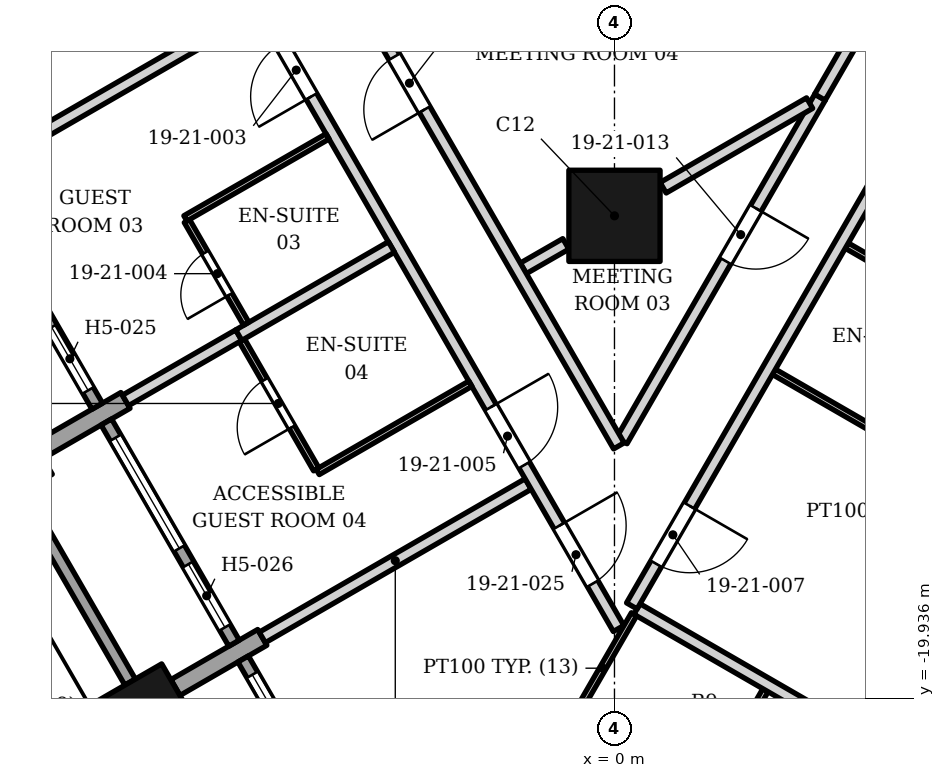
"""IFC4 building model, lengths in metres.
Left out: names, types, materials, properties, quantities, classifications, styles, units other than length and angle.
Written with IfcOpenShell. Run it as: python <this file> out.ifc"""

import sys

from ifc_helpers import new_model, si_unit, direction, frame, frame_2d, origin, origin_2d, place, context, subcontext, project, spatial, rectangle, extrude, element, fill, save


model = new_model("IFC4")
c1 = context("Model", 3, precision=1e-05, world=origin(), true_north=direction((0.0, 1.0)))
c2 = subcontext(c1, "Body", "Model", "MODEL_VIEW")
j1 = project(units=[si_unit("LENGTHUNIT", "METRE"), si_unit("PLANEANGLEUNIT", "RADIAN")], contexts=[c1])
p1 = place(None, origin())
s1 = spatial("IfcSite", under=j1, at=p1, CompositionType="ELEMENT")
p2 = place(p1, origin())
s2 = spatial("IfcBuilding", under=s1, at=p2, CompositionType="ELEMENT")
p3 = place(p2, frame((0.0, 0.0, 91.8)))
s3 = spatial("IfcBuildingStorey", under=s2, at=p3, CompositionType="ELEMENT", Elevation=91.8)
p4 = place(p3, frame((0.0, -12.0, 0.0), z_axis=(0.0, 0.0, 1.0), x_axis=(1.0, 0.0, 0.0)))
e1 = element("IfcColumn", 1, at=p4, inside=s3, PredefinedType="COLUMN", context=c2, shape_type="SweptSolid", body=[
    extrude(rectangle(XDim=1.5, YDim=1.5, at=origin_2d()), origin(), (0.0, 0.0, 1.0), 3.4),
])
p5 = place(p3, frame((-7.741, -20.058, 0.0), z_axis=(0.0, 0.0, 1.0), x_axis=(0.5, -0.866025403784, 0.0)))
e2 = element("IfcColumn", 2, at=p5, inside=s3, PredefinedType="COLUMN", context=c2, shape_type="SweptSolid", body=[
    extrude(rectangle(XDim=0.9, YDim=1.2, at=origin_2d()), origin(), (0.0, 0.0, 1.0), 3.4),
])
p6 = place(p3, frame((-10.51, -16.46, 0.0), z_axis=(0.0, 0.0, 1.0), x_axis=(0.865955154139, 0.50012165622, 0.0)))
e3 = element("IfcWall", 3, at=p6, inside=s3, PredefinedType="SOLIDWALL", context=c2, shape_type="SweptSolid", body=[
    extrude(rectangle(XDim=1.2, YDim=0.9, at=frame_2d((0.6, 0.0))), origin(), (0.0, 0.0, 1.0), 2.63),
])
for number, where, z_axis, x_axis in (
    (4, (-8.042, -15.035, 0.0), (0.0, 0.0, 1.0), (-0.866, -0.5, 0.0)),
    (5, (-7.221, -19.758, 0.0), (0.0, 0.0, 1.0), (0.866, 0.5, 0.0)),
):
    element("IfcWall", number, at=place(p3, frame(where, z_axis=z_axis, x_axis=x_axis)), inside=s3, PredefinedType="SOLIDWALL", context=c2, shape_type="SweptSolid", body=[
        extrude(rectangle(XDim=1.65, YDim=0.3, at=frame_2d((0.825, 0.0))), origin(), (0.0, 0.0, 1.0), 2.65),
    ])
p7 = place(p3, frame((-10.607, -11.493, 0.0), z_axis=(0.0, 0.0, 1.0), x_axis=(0.500002543286, -0.866023935413, 0.0)))
e6 = element("IfcWall", 6, at=p7, inside=s3, PredefinedType="ELEMENTEDWALL", context=c2, shape_type="SweptSolid", body=[
    extrude(rectangle(XDim=4.2, YDim=0.2, at=frame_2d((2.1, 0.0))), origin(), (0.0, 0.0, 1.0), 2.45),
])
p8 = place(p7, frame((0.3, 0.0, 0.6)))
e7 = element("IfcOpeningElement", 7, at=p8, cuts=e6, PredefinedType="OPENING", context=c2, shape_type="SweptSolid", body=[
    extrude(rectangle(XDim=2.1, YDim=1.75, at=frame_2d((1.05, 0.875))), frame((0.0, 0.11, 0.0), z_axis=(0.0, -1.0, 0.0), x_axis=(1.0, 0.0, 0.0)), (0.0, 0.0, 1.0), 0.22),
])
p9 = place(p7, frame((2.7, 0.0, 0.0)))
e8 = element("IfcOpeningElement", 8, at=p9, cuts=e6, PredefinedType="OPENING", context=c2, shape_type="SweptSolid", body=[
    extrude(rectangle(XDim=1.2, YDim=2.35, at=frame_2d((0.6, 1.175))), frame((0.0, 0.11, 0.0), z_axis=(0.0, -1.0, 0.0), x_axis=(1.0, 0.0, 0.0)), (0.0, 0.0, 1.0), 0.22),
])
p10 = place(p3, frame((-9.766, -16.55, 0.0), z_axis=(0.0, 0.0, 1.0), x_axis=(0.499931829785, -0.866064758299, 0.0)))
e9 = element("IfcWall", 9, at=p10, inside=s3, PredefinedType="SOLIDWALL", context=c2, shape_type="SweptSolid", body=[
    extrude(rectangle(XDim=3.6, YDim=0.2, at=frame_2d((1.8, 0.0))), origin(), (0.0, 0.0, 1.0), 2.63),
])
p11 = place(p3, frame((-8.357, -15.39, 0.0), z_axis=(0.0, 0.0, 1.0), x_axis=(0.500027713859, -0.866009402589, 0.0)))
e10 = element("IfcWall", 10, at=p11, inside=s3, PredefinedType="ELEMENTEDWALL", context=c2, shape_type="SweptSolid", body=[
    extrude(rectangle(XDim=4.2, YDim=0.2, at=frame_2d((2.1, 0.0))), origin(), (0.0, 0.0, 1.0), 2.65),
])
p12 = place(p11, frame((0.3, 0.0, 0.6)))
e11 = element("IfcOpeningElement", 11, at=p12, cuts=e10, PredefinedType="OPENING", context=c2, shape_type="SweptSolid", body=[
    extrude(rectangle(XDim=2.1, YDim=1.8, at=frame_2d((1.05, 0.9))), frame((0.0, 0.11, 0.0), z_axis=(0.0, -1.0, 0.0), x_axis=(1.0, 0.0, 0.0)), (0.0, 0.0, 1.0), 0.22),
])
p13 = place(p11, frame((2.7, 0.0, 0.0)))
e12 = element("IfcOpeningElement", 12, at=p13, cuts=e10, PredefinedType="OPENING", context=c2, shape_type="SweptSolid", body=[
    extrude(rectangle(XDim=1.2, YDim=2.4, at=frame_2d((0.6, 1.2))), frame((0.0, 0.11, 0.0), z_axis=(0.0, -1.0, 0.0), x_axis=(1.0, 0.0, 0.0)), (0.0, 0.0, 1.0), 0.22),
])
p14 = place(p3, frame((-6.107, -19.287, 0.0), z_axis=(0.0, 0.0, 1.0), x_axis=(0.500002543286, -0.866023935413, 0.0)))
e13 = element("IfcWall", 13, at=p14, inside=s3, PredefinedType="ELEMENTEDWALL", context=c2, shape_type="SweptSolid", body=[
    extrude(rectangle(XDim=4.2, YDim=0.2, at=frame_2d((2.1, 0.0))), origin(), (0.0, 0.0, 1.0), 2.628),
])
p15 = place(p14, frame((0.3, 0.0, 0.6)))
e14 = element("IfcOpeningElement", 14, at=p15, cuts=e13, PredefinedType="OPENING", context=c2, shape_type="SweptSolid", body=[
    extrude(rectangle(XDim=2.1, YDim=1.8, at=frame_2d((1.05, 0.9))), frame((0.0, 0.11, 0.0), z_axis=(0.0, -1.0, 0.0), x_axis=(1.0, 0.0, 0.0)), (0.0, 0.0, 1.0), 0.22),
])
p16 = place(p14, frame((2.7, 0.0, 0.0)))
e15 = element("IfcOpeningElement", 15, at=p16, cuts=e13, PredefinedType="OPENING", context=c2, shape_type="SweptSolid", body=[
    extrude(rectangle(XDim=1.2, YDim=2.4, at=frame_2d((0.6, 1.2))), frame((0.0, 0.11, 0.0), z_axis=(0.0, -1.0, 0.0), x_axis=(1.0, 0.0, 0.0)), (0.0, 0.0, 1.0), 0.22),
])
p17 = place(p3, frame((1.46, -21.576, 0.0), z_axis=(0.0, 0.0, 1.0), x_axis=(0.499354689006, 0.866397653833, 0.0)))
e16 = element("IfcWall", 16, at=p17, inside=s3, PredefinedType="PARTITIONING", context=c2, shape_type="SweptSolid", body=[
    extrude(rectangle(XDim=2.05, YDim=0.1, at=frame_2d((1.025, 0.0))), origin(), (0.0, 0.0, 1.0), 3.23),
])
p18 = place(p3, frame((-5.792, -18.933, 0.0), z_axis=(0.0, 0.0, 1.0), x_axis=(0.866155802953, 0.499774073968, 0.0)))
e17 = element("IfcWall", 17, at=p18, inside=s3, PredefinedType="PARTITIONING", context=c2, shape_type="SweptSolid", body=[
    extrude(rectangle(XDim=5.05, YDim=0.2, at=frame_2d((2.525, 0.0))), origin(), (0.0, 0.0, 1.0), 2.628),
])
p19 = place(p3, frame((-10.334, -0.77, 0.0), z_axis=(0.0, 0.0, 1.0), x_axis=(0.499996405163, -0.866027479255, 0.0)))
e18 = element("IfcWall", 18, at=p19, inside=s3, PredefinedType="PARTITIONING", context=c2, shape_type="SweptSolid", body=[
    extrude(rectangle(XDim=20.803, YDim=0.2, at=frame_2d((10.401, 0.0))), origin(), (0.0, 0.0, 1.0), 2.384),
])
p20 = place(p19, frame((4.0, 0.0, 0.0)))
e19 = element("IfcOpeningElement", 19, at=p20, cuts=e18, PredefinedType="OPENING", context=c2, shape_type="SweptSolid", body=[
    extrude(rectangle(XDim=1.0, YDim=2.1, at=frame_2d((0.5, 1.05))), frame((0.0, 0.11, 0.0), z_axis=(0.0, -1.0, 0.0), x_axis=(1.0, 0.0, 0.0)), (0.0, 0.0, 1.0), 0.22),
])
p21 = place(p19, frame((9.7, 0.0, 0.0)))
e20 = element("IfcOpeningElement", 20, at=p21, cuts=e18, PredefinedType="OPENING", context=c2, shape_type="SweptSolid", body=[
    extrude(rectangle(XDim=1.0, YDim=2.1, at=frame_2d((0.5, 1.05))), frame((0.0, 0.11, 0.0), z_axis=(0.0, -1.0, 0.0), x_axis=(1.0, 0.0, 0.0)), (0.0, 0.0, 1.0), 0.22),
])
p22 = place(p19, frame((16.6, 0.0, 0.0)))
e21 = element("IfcOpeningElement", 21, at=p22, cuts=e18, PredefinedType="OPENING", context=c2, shape_type="SweptSolid", body=[
    extrude(rectangle(XDim=1.1, YDim=2.1, at=frame_2d((0.55, 1.05))), frame((0.0, 0.11, 0.0), z_axis=(0.0, -1.0, 0.0), x_axis=(1.0, 0.0, 0.0)), (0.0, 0.0, 1.0), 0.22),
])
p23 = place(p19, frame((18.852, 0.0, 0.0)))
e22 = element("IfcOpeningElement", 22, at=p23, cuts=e18, PredefinedType="OPENING", context=c2, shape_type="SweptSolid", body=[
    extrude(rectangle(XDim=1.1, YDim=2.1, at=frame_2d((0.55, 1.05))), frame((0.0, 0.11, 0.0), z_axis=(0.0, -1.0, 0.0), x_axis=(1.0, 0.0, 0.0)), (0.0, 0.0, 1.0), 0.22),
])
p24 = place(p3, frame((-0.705, -20.326, 0.0), z_axis=(0.0, 0.0, 1.0), x_axis=(0.500698204548, 0.865621919756, 0.0)))
e23 = element("IfcWall", 23, at=p24, inside=s3, PredefinedType="PARTITIONING", context=c2, shape_type="SweptSolid", body=[
    extrude(rectangle(XDim=2.05, YDim=0.1, at=frame_2d((1.025, 0.0))), origin(), (0.0, 0.0, 1.0), 2.552),
])
p25 = place(p3, frame((0.37, -18.466, 0.0), z_axis=(0.0, 0.0, 1.0), x_axis=(0.866027438349, -0.499996476014, 0.0)))
e24 = element("IfcWall", 24, at=p25, inside=s3, PredefinedType="PARTITIONING", context=c2, shape_type="SweptSolid", body=[
    extrude(rectangle(XDim=7.25, YDim=0.2, at=frame_2d((3.625, 0.0))), origin(), (0.0, 0.0, 1.0), 2.552),
])
p26 = place(p3, frame((-4.88, -16.212, 0.0), z_axis=(0.0, 0.0, 1.0), x_axis=(0.865729701078, 0.500511822708, 0.0)))
e25 = element("IfcWall", 25, at=p26, inside=s3, PredefinedType="PARTITIONING", context=c2, shape_type="SweptSolid", body=[
    extrude(rectangle(XDim=2.9, YDim=0.1, at=frame_2d((1.45, 0.0))), origin(), (0.0, 0.0, 1.0), 2.628),
])
p27 = place(p3, frame((0.119, -15.698, 0.0), z_axis=(0.0, 0.0, 1.0), x_axis=(0.499994537821, 0.866028557352, 0.0)))
e26 = element("IfcWall", 26, at=p27, inside=s3, PredefinedType="PARTITIONING", context=c2, shape_type="SweptSolid", body=[
    extrude(rectangle(XDim=6.524, YDim=0.2, at=frame_2d((3.262, 0.0))), origin(), (0.0, 0.0, 1.0), 2.302),
])
p28 = place(p27, frame((3.413, 0.0, 0.0)))
e27 = element("IfcOpeningElement", 27, at=p28, cuts=e26, PredefinedType="OPENING", context=c2, shape_type="SweptSolid", body=[
    extrude(rectangle(XDim=1.0, YDim=2.1, at=frame_2d((0.5, 1.05))), frame((0.0, 0.11, 0.0), z_axis=(0.0, -1.0, 0.0), x_axis=(1.0, 0.0, 0.0)), (0.0, 0.0, 1.0), 0.22),
])
p29 = place(p3, frame((2.621, -14.565, 0.0), z_axis=(0.0, 0.0, 1.0), x_axis=(0.866035857012, -0.499981894041, 0.0)))
e28 = element("IfcWall", 28, at=p29, inside=s3, PredefinedType="PARTITIONING", context=c2, shape_type="SweptSolid", body=[
    extrude(rectangle(XDim=7.25, YDim=0.1, at=frame_2d((3.625, 0.0))), origin(), (0.0, 0.0, 1.0), 2.552),
])
p30 = place(p29, frame((4.65, 0.0, 0.0)))
e29 = element("IfcOpeningElement", 29, at=p30, cuts=e28, PredefinedType="OPENING", context=c2, shape_type="SweptSolid", body=[
    extrude(rectangle(XDim=0.9, YDim=2.1, at=frame_2d((0.45, 1.05))), frame((0.0, 0.06, 0.0), z_axis=(0.0, -1.0, 0.0), x_axis=(1.0, 0.0, 0.0)), (0.0, 0.0, 1.0), 0.12),
])
p31 = place(p3, frame((-6.129, -14.046, 0.0), z_axis=(0.0, 0.0, 1.0), x_axis=(0.499408942836, -0.866366381974, 0.0)))
e30 = element("IfcWall", 30, at=p31, inside=s3, PredefinedType="PARTITIONING", context=c2, shape_type="SweptSolid", body=[
    extrude(rectangle(XDim=2.45, YDim=0.1, at=frame_2d((1.225, 0.0))), origin(), (0.0, 0.0, 1.0), 3.23),
])
p32 = place(p31, frame((0.75, 0.0, 0.0)))
e31 = element("IfcOpeningElement", 31, at=p32, cuts=e30, PredefinedType="OPENING", context=c2, shape_type="SweptSolid", body=[
    extrude(rectangle(XDim=0.9, YDim=2.1, at=frame_2d((0.45, 1.05))), frame((0.0, 0.06, 0.0), z_axis=(0.0, -1.0, 0.0), x_axis=(1.0, 0.0, 0.0)), (0.0, 0.0, 1.0), 0.12),
])
p33 = place(p3, frame((-8.042, -15.036, 0.0), z_axis=(0.0, 0.0, 1.0), x_axis=(0.866448284977, 0.499266831925, 0.0)))
e32 = element("IfcWall", 32, at=p33, inside=s3, PredefinedType="PARTITIONING", context=c2, shape_type="SweptSolid", body=[
    extrude(rectangle(XDim=2.15, YDim=0.2, at=frame_2d((1.075, 0.0))), origin(), (0.0, 0.0, 1.0), 3.23),
])
p34 = place(p3, frame((3.82, -12.49, 0.0), z_axis=(0.0, 0.0, 1.0), x_axis=(0.866326367614, -0.499478352661, 0.0)))
e33 = element("IfcWall", 33, at=p34, inside=s3, PredefinedType="PARTITIONING", context=c2, shape_type="SweptSolid", body=[
    extrude(rectangle(XDim=2.8, YDim=0.1, at=frame_2d((1.4, 0.0))), origin(), (0.0, 0.0, 1.0), 2.552),
])
p35 = place(p3, frame((-1.501, -12.865, 0.0), z_axis=(0.0, 0.0, 1.0), x_axis=(0.86708889474, 0.49815343883, 0.0)))
e34 = element("IfcWall", 34, at=p35, inside=s3, PredefinedType="PARTITIONING", context=c2, shape_type="SweptSolid", body=[
    extrude(rectangle(XDim=0.809, YDim=0.2, at=frame_2d((0.404, 0.0))), origin(), (0.0, 0.0, 1.0), 3.23),
])
p36 = place(p3, frame((-6.179, -13.962, 0.0), z_axis=(0.0, 0.0, 1.0), x_axis=(0.866011727401, 0.500023687443, 0.0)))
e35 = element("IfcWall", 35, at=p36, inside=s3, PredefinedType="PARTITIONING", context=c2, shape_type="SweptSolid", body=[
    extrude(rectangle(XDim=2.9, YDim=0.2, at=frame_2d((1.45, 0.0))), origin(), (0.0, 0.0, 1.0), 2.628),
])
p37 = place(p3, frame((-7.032, -12.085, 0.0), z_axis=(0.0, 0.0, 1.0), x_axis=(0.500098182527, -0.865968710655, 0.0)))
e36 = element("IfcWall", 36, at=p37, inside=s3, PredefinedType="PARTITIONING", context=c2, shape_type="SweptSolid", body=[
    extrude(rectangle(XDim=1.95, YDim=0.1, at=frame_2d((0.975, 0.0))), origin(), (0.0, 0.0, 1.0), 2.45),
])
p38 = place(p37, frame((0.6, 0.0, 0.0)))
e37 = element("IfcOpeningElement", 37, at=p38, cuts=e36, PredefinedType="OPENING", context=c2, shape_type="SweptSolid", body=[
    extrude(rectangle(XDim=0.8, YDim=2.1, at=frame_2d((0.4, 1.05))), frame((0.0, 0.06, 0.0), z_axis=(0.0, -1.0, 0.0), x_axis=(1.0, 0.0, 0.0)), (0.0, 0.0, 1.0), 0.12),
])
p39 = place(p3, frame((0.8, -11.538, 0.0), z_axis=(0.0, 0.0, 1.0), x_axis=(0.865884499667, 0.500243973713, 0.0)))
e38 = element("IfcWall", 38, at=p39, inside=s3, PredefinedType="PARTITIONING", context=c2, shape_type="SweptSolid", body=[
    extrude(rectangle(XDim=2.782, YDim=0.2, at=frame_2d((1.391, 0.0))), origin(), (0.0, 0.0, 1.0), 3.23),
])
p40 = place(p3, frame((-7.057, -12.042, 0.0), z_axis=(0.0, 0.0, 1.0), x_axis=(0.866339109022, 0.499456252518, 0.0)))
e39 = element("IfcWall", 39, at=p40, inside=s3, PredefinedType="PARTITIONING", context=c2, shape_type="SweptSolid", body=[
    extrude(rectangle(XDim=2.7, YDim=0.1, at=frame_2d((1.35, 0.0))), origin(), (0.0, 0.0, 1.0), 2.45),
])
p41 = place(p3, frame((0.285, -18.415, 0.0), z_axis=(0.0, 0.0, 1.0), x_axis=(0.5000018851, 0.866024315419, 0.0)))
e40 = element("IfcWall", 40, at=p41, inside=s3, PredefinedType="PARTITIONING", context=c2, shape_type="SweptSolid", body=[
    extrude(rectangle(XDim=9.0, YDim=0.2, at=frame_2d((4.5, 0.0))), origin(), (0.0, 0.0, 1.0), 2.302),
])
p42 = place(p41, frame((0.8, 0.0, 0.0)))
e41 = element("IfcOpeningElement", 41, at=p42, cuts=e40, PredefinedType="OPENING", context=c2, shape_type="SweptSolid", body=[
    extrude(rectangle(XDim=1.1, YDim=2.1, at=frame_2d((0.55, 1.05))), frame((0.0, 0.11, 0.0), z_axis=(0.0, -1.0, 0.0), x_axis=(1.0, 0.0, 0.0)), (0.0, 0.0, 1.0), 0.22),
])
p43 = place(p3, frame((3.379, -10.049, 0.0), z_axis=(0.0, 0.0, 1.0), x_axis=(0.50000242408, 0.866024004237, 0.0)))
e42 = element("IfcWall", 42, at=p43, inside=s3, PredefinedType="PARTITIONING", context=c2, shape_type="SweptSolid", body=[
    extrude(rectangle(XDim=15.877, YDim=0.2, at=frame_2d((7.938, 0.0))), origin(), (0.0, 0.0, 1.0), 2.384),
])
p44 = place(p43, frame((9.359, 0.0, 0.0)))
e43 = element("IfcOpeningElement", 43, at=p44, cuts=e42, PredefinedType="OPENING", context=c2, shape_type="SweptSolid", body=[
    extrude(rectangle(XDim=1.0, YDim=2.1, at=frame_2d((0.5, 1.05))), frame((0.0, 0.11, 0.0), z_axis=(0.0, -1.0, 0.0), x_axis=(1.0, 0.0, 0.0)), (0.0, 0.0, 1.0), 0.22),
])
p45 = place(p3, frame((-10.292, -11.138, 0.0), z_axis=(0.0, 0.0, 1.0), x_axis=(0.866188805601, 0.49971687289, 0.0)))
e44 = element("IfcWall", 44, at=p45, inside=s3, PredefinedType="PARTITIONING", context=c2, shape_type="SweptSolid", body=[
    extrude(rectangle(XDim=5.05, YDim=0.2, at=frame_2d((2.525, 0.0))), origin(), (0.0, 0.0, 1.0), 2.552),
])
p46 = place(p3, frame((-11.18, 3.7, 0.0), z_axis=(0.0, 0.0, 1.0), x_axis=(0.500129162475, -0.865950818951, 0.0)))
e45 = element("IfcWall", 45, at=p46, inside=s3, PredefinedType="PARTITIONING", context=c2, shape_type="SweptSolid", body=[
    extrude(rectangle(XDim=22.499, YDim=0.2, at=frame_2d((11.249, 0.0))), origin(), (0.0, 0.0, 1.0), 2.384),
])
p47 = place(p46, frame((9.13, 0.0, 0.0)))
e46 = element("IfcOpeningElement", 46, at=p47, cuts=e45, PredefinedType="OPENING", context=c2, shape_type="SweptSolid", body=[
    extrude(rectangle(XDim=1.0, YDim=2.1, at=frame_2d((0.5, 1.05))), frame((0.0, 0.11, 0.0), z_axis=(0.0, -1.0, 0.0), x_axis=(1.0, 0.0, 0.0)), (0.0, 0.0, 1.0), 0.22),
])
p48 = place(p46, frame((15.111, 0.0, 0.0)))
e47 = element("IfcOpeningElement", 47, at=p48, cuts=e45, PredefinedType="OPENING", context=c2, shape_type="SweptSolid", body=[
    extrude(rectangle(XDim=1.0, YDim=2.1, at=frame_2d((0.5, 1.05))), frame((0.0, 0.11, 0.0), z_axis=(0.0, -1.0, 0.0), x_axis=(1.0, 0.0, 0.0)), (0.0, 0.0, 1.0), 0.22),
])
p49 = place(p46, frame((5.834, 0.0, 0.0)))
e48 = element("IfcOpeningElement", 48, at=p49, cuts=e45, PredefinedType="OPENING", context=c2, shape_type="SweptSolid", body=[
    extrude(rectangle(XDim=1.0, YDim=2.1, at=frame_2d((0.5, 1.05))), frame((0.0, 0.11, 0.0), z_axis=(0.0, -1.0, 0.0), x_axis=(1.0, 0.0, 0.0)), (0.0, 0.0, 1.0), 0.22),
])
p50 = place(p9, origin())
e49 = element("IfcDoor", 49, at=p50, inside=s3, OperationType="SINGLE_SWING_LEFT", PredefinedType="DOOR", context=c2, shape_type="SweptSolid", body=[
    extrude(rectangle(XDim=1.2, YDim=2.35, at=frame_2d((0.6, 1.175))), frame((0.0, 0.025, 0.0), z_axis=(0.0, -1.0, 0.0), x_axis=(1.0, 0.0, 0.0)), (0.0, 0.0, 1.0), 0.05),
])
fill(e8, e49)
p51 = place(p12, origin())
e50 = element("IfcWindow", 50, at=p51, inside=s3, PartitioningType="SINGLE_PANEL", PredefinedType="WINDOW", context=c2, shape_type="SweptSolid", body=[
    extrude(rectangle(XDim=2.1, YDim=1.8, at=frame_2d((1.05, 0.9))), frame((0.0, 0.03, 0.0), z_axis=(0.0, -1.0, 0.0), x_axis=(1.0, 0.0, 0.0)), (0.0, 0.0, 1.0), 0.06),
])
fill(e11, e50)
p52 = place(p13, origin())
e51 = element("IfcDoor", 51, at=p52, inside=s3, OperationType="SINGLE_SWING_LEFT", PredefinedType="DOOR", context=c2, shape_type="SweptSolid", body=[
    extrude(rectangle(XDim=1.2, YDim=2.4, at=frame_2d((0.6, 1.2))), frame((0.0, 0.025, 0.0), z_axis=(0.0, -1.0, 0.0), x_axis=(1.0, 0.0, 0.0)), (0.0, 0.0, 1.0), 0.05),
])
fill(e12, e51)
p53 = place(p15, origin())
e52 = element("IfcWindow", 52, at=p53, inside=s3, PartitioningType="SINGLE_PANEL", PredefinedType="WINDOW", context=c2, shape_type="SweptSolid", body=[
    extrude(rectangle(XDim=2.1, YDim=1.8, at=frame_2d((1.05, 0.9))), frame((0.0, 0.03, 0.0), z_axis=(0.0, -1.0, 0.0), x_axis=(1.0, 0.0, 0.0)), (0.0, 0.0, 1.0), 0.06),
])
fill(e14, e52)
p54 = place(p21, origin())
e53 = element("IfcDoor", 53, at=p54, inside=s3, OperationType="SINGLE_SWING_RIGHT", PredefinedType="DOOR", context=c2, shape_type="SweptSolid", body=[
    extrude(rectangle(XDim=1.0, YDim=2.1, at=frame_2d((0.5, 1.05))), frame((0.0, 0.025, 0.0), z_axis=(0.0, -1.0, 0.0), x_axis=(1.0, 0.0, 0.0)), (0.0, 0.0, 1.0), 0.05),
])
fill(e20, e53)
p55 = place(p38, origin())
e54 = element("IfcDoor", 54, at=p55, inside=s3, OperationType="SINGLE_SWING_RIGHT", PredefinedType="DOOR", context=c2, shape_type="SweptSolid", body=[
    extrude(rectangle(XDim=0.8, YDim=2.1, at=frame_2d((0.4, 1.05))), frame((0.0, 0.025, 0.0), z_axis=(0.0, -1.0, 0.0), x_axis=(1.0, 0.0, 0.0)), (0.0, 0.0, 1.0), 0.05),
])
fill(e37, e54)
p56 = place(p22, origin())
e55 = element("IfcDoor", 55, at=p56, inside=s3, OperationType="SINGLE_SWING_LEFT", PredefinedType="DOOR", context=c2, shape_type="SweptSolid", body=[
    extrude(rectangle(XDim=1.1, YDim=2.1, at=frame_2d((0.55, 1.05))), frame((0.0, 0.025, 0.0), z_axis=(0.0, -1.0, 0.0), x_axis=(1.0, 0.0, 0.0)), (0.0, 0.0, 1.0), 0.05),
])
fill(e21, e55)
p57 = place(p32, origin())
e56 = element("IfcDoor", 56, at=p57, inside=s3, OperationType="SINGLE_SWING_RIGHT", PredefinedType="DOOR", context=c2, shape_type="SweptSolid", body=[
    extrude(rectangle(XDim=0.9, YDim=2.1, at=frame_2d((0.45, 1.05))), frame((0.0, 0.025, 0.0), z_axis=(0.0, -1.0, 0.0), x_axis=(1.0, 0.0, 0.0)), (0.0, 0.0, 1.0), 0.05),
])
fill(e31, e56)
p58 = place(p42, origin())
e57 = element("IfcDoor", 57, at=p58, inside=s3, OperationType="SINGLE_SWING_RIGHT", PredefinedType="DOOR", context=c2, shape_type="SweptSolid", body=[
    extrude(rectangle(XDim=1.1, YDim=2.1, at=frame_2d((0.55, 1.05))), frame((0.0, 0.025, 0.0), z_axis=(0.0, -1.0, 0.0), x_axis=(1.0, 0.0, 0.0)), (0.0, 0.0, 1.0), 0.05),
])
fill(e41, e57)
p59 = place(p28, origin())
e58 = element("IfcDoor", 58, at=p59, inside=s3, OperationType="SINGLE_SWING_RIGHT", PredefinedType="DOOR", context=c2, shape_type="SweptSolid", body=[
    extrude(rectangle(XDim=1.0, YDim=2.1, at=frame_2d((0.5, 1.05))), frame((0.0, 0.025, 0.0), z_axis=(0.0, -1.0, 0.0), x_axis=(1.0, 0.0, 0.0)), (0.0, 0.0, 1.0), 0.05),
])
fill(e27, e58)
p60 = place(p48, origin())
e59 = element("IfcDoor", 59, at=p60, inside=s3, OperationType="SINGLE_SWING_RIGHT", PredefinedType="DOOR", context=c2, shape_type="SweptSolid", body=[
    extrude(rectangle(XDim=1.0, YDim=2.1, at=frame_2d((0.5, 1.05))), frame((0.0, 0.025, 0.0), z_axis=(0.0, -1.0, 0.0), x_axis=(1.0, 0.0, 0.0)), (0.0, 0.0, 1.0), 0.05),
])
fill(e47, e59)
p61 = place(p23, origin())
e60 = element("IfcDoor", 60, at=p61, inside=s3, OperationType="SINGLE_SWING_LEFT", PredefinedType="DOOR", context=c2, shape_type="SweptSolid", body=[
    extrude(rectangle(XDim=1.1, YDim=2.1, at=frame_2d((0.55, 1.05))), frame((0.0, 0.025, 0.0), z_axis=(0.0, -1.0, 0.0), x_axis=(1.0, 0.0, 0.0)), (0.0, 0.0, 1.0), 0.05),
])
fill(e22, e60)
save(model, sys.argv[1])
